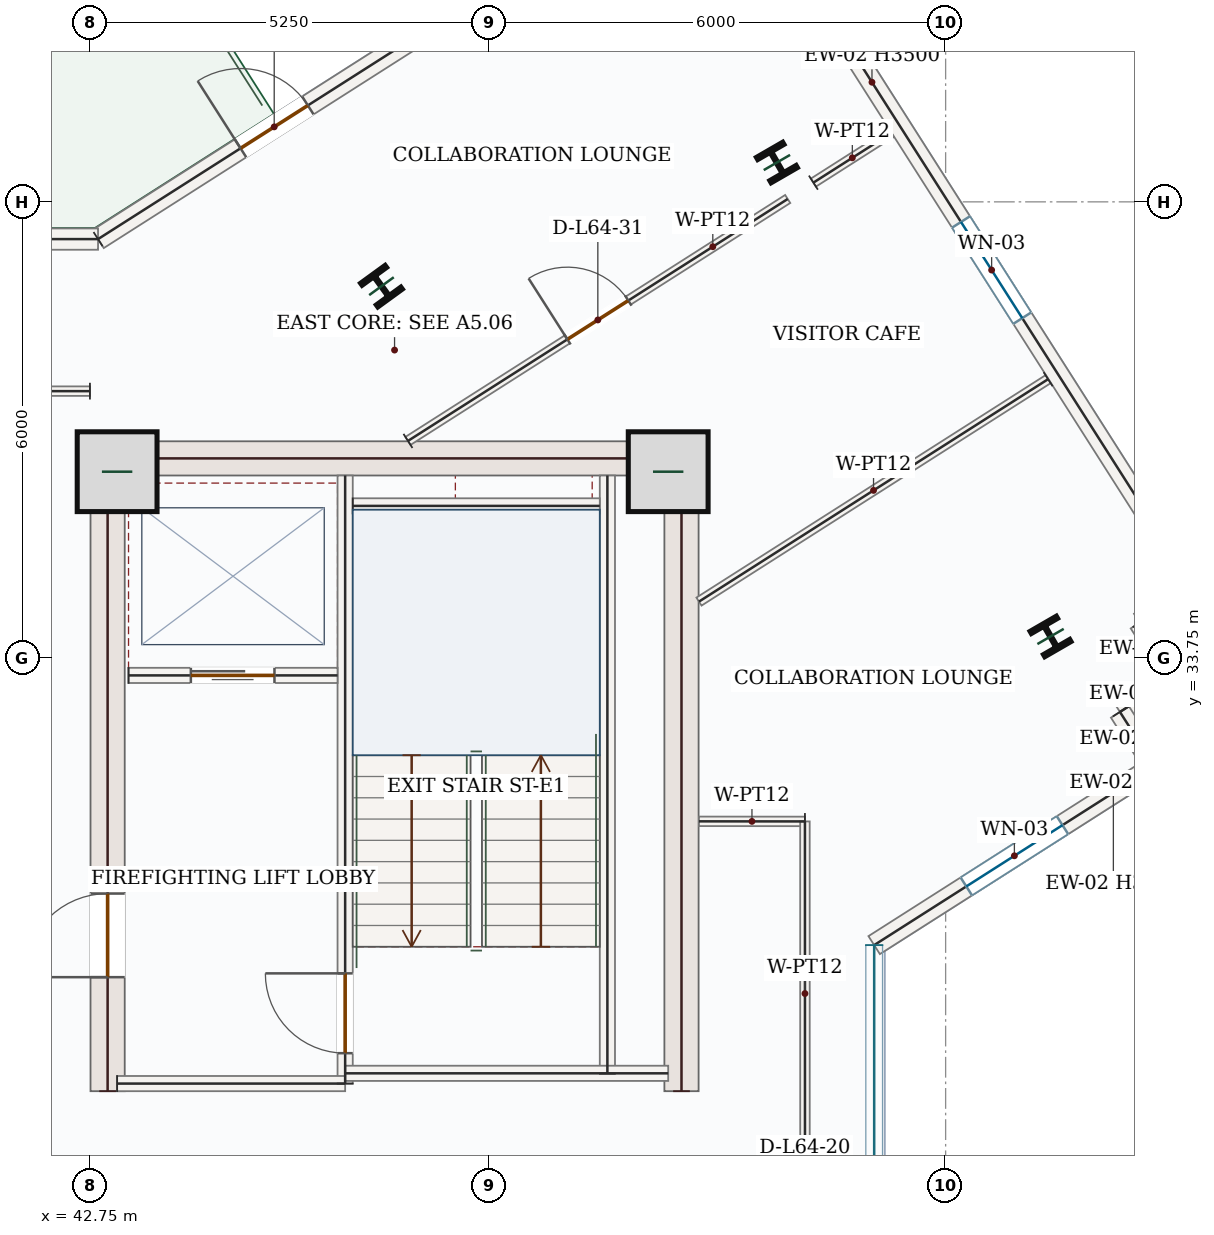
"""IFC4 building model, lengths in metres.
Left out: names, types, materials, properties, quantities, classifications, styles, units other than length and angle.
Written with IfcOpenShell. Run it as: python <this file> out.ifc"""

import sys

from ifc_helpers import new_model, si_unit, direction, frame, frame_2d, origin, origin_2d, place, context, subcontext, project, spatial, rectangle, i_section, extrude, source, transform, mapped, element, fill, save


model = new_model("IFC4")
c1 = context("Model", 3, precision=1e-05, world=origin(), true_north=direction((0.0, 1.0)))
c2 = subcontext(c1, "Body", "Model", "MODEL_VIEW")
j1 = project(units=[si_unit("LENGTHUNIT", "METRE"), si_unit("PLANEANGLEUNIT", "RADIAN")], contexts=[c1])
p1 = place(None, origin())
s1 = spatial("IfcSite", under=j1, at=p1, CompositionType="ELEMENT")
p2 = place(p1, origin())
s2 = spatial("IfcBuilding", under=s1, at=p2, CompositionType="ELEMENT")
p3 = place(p2, frame((0.0, 0.0, 269.1)))
s3 = spatial("IfcBuildingStorey", under=s2, at=p3, CompositionType="ELEMENT", Elevation=269.1)
p4 = place(p3, frame((42.975, 28.05, 0.0), z_axis=(0.0, 0.0, 1.0), x_axis=(0.0, 1.0, 0.0)))
e1 = element("IfcWall", 1, at=p4, inside=s3, PredefinedType="SHEAR", context=c2, shape_type="SweptSolid", body=[
    extrude(rectangle(XDim=8.55, YDim=0.45, at=frame_2d((4.275, 0.0))), origin(), (0.0, 0.0, 1.0), 3.5),
])
p5 = place(p4, frame((1.5, 0.0, 0.0)))
e2 = element("IfcOpeningElement", 2, at=p5, cuts=e1, PredefinedType="OPENING", context=c2, shape_type="SweptSolid", body=[
    extrude(rectangle(XDim=1.1, YDim=2.2, at=frame_2d((0.55, 1.1))), frame((0.0, 0.235, 0.0), z_axis=(0.0, -1.0, 0.0), x_axis=(1.0, 0.0, 0.0)), (0.0, 0.0, 1.0), 0.47),
])
m1 = source(origin(), c2, "Body", "SweptSolid", [
    extrude(rectangle(XDim=8.55, YDim=0.45, at=frame_2d((4.275, 0.0))), origin(), (0.0, 0.0, 1.0), 3.5),
])
p6 = place(p3, frame((50.525, 28.05, 0.0), z_axis=(0.0, 0.0, 1.0), x_axis=(0.0, 1.0, 0.0)))
e3 = element("IfcWall", 3, at=p6, inside=s3, PredefinedType="SHEAR", context=c2, shape_type="MappedRepresentation", body=[
    mapped(m1, transform((0.0, 0.0, 0.0), x_axis=(1.0, 0.0, 0.0), y_axis=(0.0, 1.0, 0.0), z_axis=(0.0, 0.0, 1.0), scale=1.0)),
])
m2 = source(origin(), c2, "Body", "SweptSolid", [
    extrude(rectangle(XDim=7.1, YDim=0.45, at=frame_2d((3.55, 0.0))), origin(), (0.0, 0.0, 1.0), 3.5),
])
p7 = place(p3, frame((43.2, 36.375, 0.0), z_axis=(0.0, 0.0, 1.0), x_axis=(1.0, 0.0, 0.0)))
e4 = element("IfcWall", 4, at=p7, inside=s3, PredefinedType="SHEAR", context=c2, shape_type="MappedRepresentation", body=[
    mapped(m2, transform((0.0, 0.0, 0.0), x_axis=(1.0, 0.0, 0.0), y_axis=(0.0, 1.0, 0.0), z_axis=(0.0, 0.0, 1.0), scale=1.0)),
])
m3 = source(origin(), c2, "Body", "SweptSolid", [
    extrude(rectangle(XDim=1.05, YDim=1.05, at=origin_2d()), origin(), (0.0, 0.0, 1.0), 3.75),
])
for number, where, z_axis, x_axis in (
    (5, (43.1, 36.2, 0.0), (0.0, 0.0, 1.0), (1.0, 0.0, 0.0)),
    (6, (50.35, 36.2, 0.0), (0.0, 0.0, 1.0), (1.0, 0.0, 0.0)),
):
    element("IfcColumn", number, at=place(p3, frame(where, z_axis=z_axis, x_axis=x_axis)), inside=s3, PredefinedType="COLUMN", context=c2, shape_type="MappedRepresentation", body=[
        mapped(m3, transform((0.0, 0.0, 0.0), x_axis=(1.0, 0.0, 0.0), y_axis=(0.0, 1.0, 0.0), z_axis=(0.0, 0.0, 1.0), scale=1.0)),
    ])
m4 = source(origin(), c2, "Body", "SweptSolid", [
    extrude(i_section(OverallWidth=0.399, OverallDepth=0.386, WebThickness=0.021, FlangeThickness=0.033, FilletRadius=0.018, at=origin_2d()), origin(), (0.0, 0.0, 1.0), 3.75),
])
for number, where, z_axis, x_axis in (
    (7, (46.578, 38.641, 0.0), (0.0, 0.0, 1.0), (0.809, 0.588, 0.0)),
    (8, (55.38, 34.032, 0.0), (0.0, 0.0, 1.0), (0.866, 0.5, 0.0)),
    (9, (51.78, 40.268, 0.0), (0.0, 0.0, 1.0), (0.866, 0.5, 0.0)),
):
    element("IfcColumn", number, at=place(p3, frame(where, z_axis=z_axis, x_axis=x_axis)), inside=s3, PredefinedType="COLUMN", context=c2, shape_type="MappedRepresentation", body=[
        mapped(m4, transform((0.0, 0.0, 0.0), x_axis=(1.0, 0.0, 0.0), y_axis=(0.0, 1.0, 0.0), z_axis=(0.0, 0.0, 1.0), scale=1.0)),
    ])
p8 = place(p3, frame((42.849, 39.26, 0.0), z_axis=(0.0, 0.0, 1.0), x_axis=(0.843388565396, 0.537304129669, 0.0)))
e10 = element("IfcWall", 10, at=p8, inside=s3, PredefinedType="SOLIDWALL", context=c2, shape_type="SweptSolid", body=[
    extrude(rectangle(XDim=7.996, YDim=0.28, at=frame_2d((3.998, 0.0))), origin(), (0.0, 0.0, 1.0), 3.5),
])
p9 = place(p8, frame((2.223, 0.0, 0.0)))
e11 = element("IfcOpeningElement", 11, at=p9, cuts=e10, PredefinedType="OPENING", context=c2, shape_type="SweptSolid", body=[
    extrude(rectangle(XDim=1.05, YDim=2.15, at=frame_2d((0.525, 1.075))), frame((0.0, 0.15, 0.0), z_axis=(0.0, -1.0, 0.0), x_axis=(1.0, 0.0, 0.0)), (0.0, 0.0, 1.0), 0.3),
])
p10 = place(p3, frame((51.94, 43.036, 0.0), z_axis=(0.0, 0.0, 1.0), x_axis=(0.537314949054, -0.843381672508, 0.0)))
e12 = element("IfcWall", 12, at=p10, inside=s3, PredefinedType="SOLIDWALL", context=c2, shape_type="SweptSolid", body=[
    extrude(rectangle(XDim=9.92, YDim=0.28, at=frame_2d((4.96, 0.0))), origin(), (0.0, 0.0, 1.0), 3.5),
])
p11 = place(p10, frame((4.21, 0.0, 0.85)))
e13 = element("IfcOpeningElement", 13, at=p11, cuts=e12, PredefinedType="OPENING", context=c2, shape_type="SweptSolid", body=[
    extrude(rectangle(XDim=1.5, YDim=1.5, at=frame_2d((0.75, 0.75))), frame((0.0, 0.15, 0.0), z_axis=(0.0, -1.0, 0.0), x_axis=(1.0, 0.0, 0.0)), (0.0, 0.0, 1.0), 0.3),
])
m5 = source(origin(), c2, "Body", "SweptSolid", [
    extrude(rectangle(XDim=0.85, YDim=0.28, at=frame_2d((0.425, 0.0))), origin(), (0.0, 0.0, 1.0), 3.5),
])
p12 = place(p3, frame((57.27, 34.67, 0.0), z_axis=(0.0, 0.0, 1.0), x_axis=(-0.843401251716, -0.537284215853, 0.0)))
e14 = element("IfcWall", 14, at=p12, inside=s3, PredefinedType="SOLIDWALL", context=c2, shape_type="MappedRepresentation", body=[
    mapped(m5, transform((0.0, 0.0, 0.0), x_axis=(1.0, 0.0, 0.0), y_axis=(0.0, 1.0, 0.0), z_axis=(0.0, 0.0, 1.0), scale=1.0)),
])
m6 = source(origin(), c2, "Body", "SweptSolid", [
    extrude(rectangle(XDim=0.85, YDim=0.28, at=frame_2d((0.425, 0.0))), origin(), (0.0, 0.0, 1.0), 3.5),
])
for number, where, z_axis, x_axis in (
    (15, (56.553, 34.213, 0.0), (0.0, 0.0, 1.0), (0.537, -0.843, 0.0)),
    (16, (57.01, 33.496, 0.0), (0.0, 0.0, 1.0), (-0.843, -0.537, 0.0)),
    (17, (56.293, 33.039, 0.0), (0.0, 0.0, 1.0), (0.537, -0.843, 0.0)),
):
    element("IfcWall", number, at=place(p3, frame(where, z_axis=z_axis, x_axis=x_axis)), inside=s3, PredefinedType="SOLIDWALL", context=c2, shape_type="MappedRepresentation", body=[
        mapped(m6, transform((0.0, 0.0, 0.0), x_axis=(1.0, 0.0, 0.0), y_axis=(0.0, 1.0, 0.0), z_axis=(0.0, 0.0, 1.0), scale=1.0)),
    ])
p13 = place(p3, frame((56.75, 32.323, 0.0), z_axis=(0.0, 0.0, 1.0), x_axis=(-0.843383352012, -0.537312312857, 0.0)))
e18 = element("IfcWall", 18, at=p13, inside=s3, PredefinedType="SOLIDWALL", context=c2, shape_type="SweptSolid", body=[
    extrude(rectangle(XDim=4.375, YDim=0.28, at=frame_2d((2.188, 0.0))), origin(), (0.0, 0.0, 1.0), 3.5),
])
p14 = place(p13, frame((1.438, 0.0, 0.85)))
e19 = element("IfcOpeningElement", 19, at=p14, cuts=e18, PredefinedType="OPENING", context=c2, shape_type="SweptSolid", body=[
    extrude(rectangle(XDim=1.5, YDim=1.5, at=frame_2d((0.75, 0.75))), frame((0.0, 0.15, 0.0), z_axis=(0.0, -1.0, 0.0), x_axis=(1.0, 0.0, 0.0)), (0.0, 0.0, 1.0), 0.3),
])
m7 = source(origin(), c2, "Body", "SweptSolid", [
    extrude(rectangle(XDim=6.763, YDim=0.28, at=frame_2d((3.381, 0.0))), origin(), (0.0, 0.0, 1.0), 3.5),
])
p15 = place(p3, frame((36.086, 39.26, 0.0), z_axis=(0.0, 0.0, 1.0), x_axis=(1.0, 0.0, 0.0)))
e20 = element("IfcWall", 20, at=p15, inside=s3, PredefinedType="SOLIDWALL", context=c2, shape_type="MappedRepresentation", body=[
    mapped(m7, transform((0.0, 0.0, 0.0), x_axis=(1.0, 0.0, 0.0), y_axis=(0.0, 1.0, 0.0), z_axis=(0.0, 0.0, 1.0), scale=1.0)),
])
m8 = source(origin(), c2, "Body", "SweptSolid", [
    extrude(rectangle(XDim=7.87, YDim=0.2, at=frame_2d((3.935, 0.0))), origin(), (0.0, 0.0, 1.0), 3.5),
])
p16 = place(p3, frame((49.55, 28.28, 0.0), z_axis=(0.0, 0.0, 1.0), x_axis=(0.0, 1.0, 0.0)))
e21 = element("IfcWall", 21, at=p16, inside=s3, PredefinedType="SOLIDWALL", context=c2, shape_type="MappedRepresentation", body=[
    mapped(m8, transform((0.0, 0.0, 0.0), x_axis=(1.0, 0.0, 0.0), y_axis=(0.0, 1.0, 0.0), z_axis=(0.0, 0.0, 1.0), scale=1.0)),
])
p17 = place(p3, frame((46.1, 28.15, 0.0), z_axis=(0.0, 0.0, 1.0), x_axis=(0.0, 1.0, 0.0)))
e22 = element("IfcWall", 22, at=p17, inside=s3, PredefinedType="SOLIDWALL", context=c2, shape_type="SweptSolid", body=[
    extrude(rectangle(XDim=8.0, YDim=0.2, at=frame_2d((4.0, 0.0))), origin(), (0.0, 0.0, 1.0), 3.5),
])
p18 = place(p17, frame((0.4, 0.0, 0.0)))
e23 = element("IfcOpeningElement", 23, at=p18, cuts=e22, PredefinedType="OPENING", context=c2, shape_type="SweptSolid", body=[
    extrude(rectangle(XDim=1.05, YDim=2.15, at=frame_2d((0.525, 1.075))), frame((0.0, 0.11, 0.0), z_axis=(0.0, -1.0, 0.0), x_axis=(1.0, 0.0, 0.0)), (0.0, 0.0, 1.0), 0.22),
])
m9 = source(origin(), c2, "Body", "SweptSolid", [
    extrude(rectangle(XDim=3.0, YDim=0.2, at=frame_2d((1.5, 0.0))), origin(), (0.0, 0.0, 1.0), 3.5),
])
p19 = place(p3, frame((43.1, 28.15, 0.0), z_axis=(0.0, 0.0, 1.0), x_axis=(1.0, 0.0, 0.0)))
e24 = element("IfcWall", 24, at=p19, inside=s3, PredefinedType="SOLIDWALL", context=c2, shape_type="MappedRepresentation", body=[
    mapped(m9, transform((0.0, 0.0, 0.0), x_axis=(1.0, 0.0, 0.0), y_axis=(0.0, 1.0, 0.0), z_axis=(0.0, 0.0, 1.0), scale=1.0)),
])
m10 = source(origin(), c2, "Body", "SweptSolid", [
    extrude(rectangle(XDim=4.25, YDim=0.2, at=frame_2d((2.125, 0.0))), origin(), (0.0, 0.0, 1.0), 3.5),
])
p20 = place(p3, frame((46.1, 28.285, 0.0), z_axis=(0.0, 0.0, 1.0), x_axis=(1.0, 0.0, 0.0)))
e25 = element("IfcWall", 25, at=p20, inside=s3, PredefinedType="SOLIDWALL", context=c2, shape_type="MappedRepresentation", body=[
    mapped(m10, transform((0.0, 0.0, 0.0), x_axis=(1.0, 0.0, 0.0), y_axis=(0.0, 1.0, 0.0), z_axis=(0.0, 0.0, 1.0), scale=1.0)),
])
m11 = source(origin(), c2, "Body", "SweptSolid", [
    extrude(rectangle(XDim=3.25, YDim=0.2, at=frame_2d((1.625, 0.0))), origin(), (0.0, 0.0, 1.0), 3.5),
])
p21 = place(p3, frame((46.2, 35.75, 0.0), z_axis=(0.0, 0.0, 1.0), x_axis=(1.0, 0.0, 0.0)))
e26 = element("IfcWall", 26, at=p21, inside=s3, PredefinedType="SOLIDWALL", context=c2, shape_type="MappedRepresentation", body=[
    mapped(m11, transform((0.0, 0.0, 0.0), x_axis=(1.0, 0.0, 0.0), y_axis=(0.0, 1.0, 0.0), z_axis=(0.0, 0.0, 1.0), scale=1.0)),
])
p22 = place(p3, frame((43.25, 33.52, 0.0), z_axis=(0.0, 0.0, 1.0), x_axis=(1.0, 0.0, 0.0)))
e27 = element("IfcWall", 27, at=p22, inside=s3, PredefinedType="SOLIDWALL", context=c2, shape_type="SweptSolid", body=[
    extrude(rectangle(XDim=2.75, YDim=0.2, at=frame_2d((1.375, 0.0))), origin(), (0.0, 0.0, 1.0), 3.5),
])
p23 = place(p22, frame((0.82, 0.0, 0.0)))
e28 = element("IfcOpeningElement", 28, at=p23, cuts=e27, PredefinedType="OPENING", context=c2, shape_type="SweptSolid", body=[
    extrude(rectangle(XDim=1.1, YDim=2.15, at=frame_2d((0.55, 1.075))), frame((0.0, 0.11, 0.0), z_axis=(0.0, -1.0, 0.0), x_axis=(1.0, 0.0, 0.0)), (0.0, 0.0, 1.0), 0.22),
])
p24 = place(p3, frame((46.927, 36.605, 0.0), z_axis=(0.0, 0.0, 1.0), x_axis=(0.843398332862, 0.537288797693, 0.0)))
e29 = element("IfcWall", 29, at=p24, inside=s3, PredefinedType="PARTITIONING", context=c2, shape_type="SweptSolid", body=[
    extrude(rectangle(XDim=5.924, YDim=0.125, at=frame_2d((2.962, 0.0))), origin(), (0.0, 0.0, 1.0), 3.5),
])
p25 = place(p24, frame((2.487, 0.0, 0.0)))
e30 = element("IfcOpeningElement", 30, at=p25, cuts=e29, PredefinedType="OPENING", context=c2, shape_type="SweptSolid", body=[
    extrude(rectangle(XDim=0.95, YDim=2.15, at=frame_2d((0.475, 1.075))), frame((0.0, 0.073, 0.0), z_axis=(0.0, -1.0, 0.0), x_axis=(1.0, 0.0, 0.0)), (0.0, 0.0, 1.0), 0.145),
])
m12 = source(origin(), c2, "Body", "SweptSolid", [
    extrude(rectangle(XDim=1.215, YDim=0.125, at=frame_2d((0.607, 0.0))), origin(), (0.0, 0.0, 1.0), 3.5),
])
p26 = place(p3, frame((52.26, 40.003, 0.0), z_axis=(0.0, 0.0, 1.0), x_axis=(0.84340481812, 0.537278617453, 0.0)))
e31 = element("IfcWall", 31, at=p26, inside=s3, PredefinedType="PARTITIONING", context=c2, shape_type="MappedRepresentation", body=[
    mapped(m12, transform((0.0, 0.0, 0.0), x_axis=(1.0, 0.0, 0.0), y_axis=(0.0, 1.0, 0.0), z_axis=(0.0, 0.0, 1.0), scale=1.0)),
])
m13 = source(origin(), c2, "Body", "SweptSolid", [
    extrude(rectangle(XDim=5.446, YDim=0.125, at=frame_2d((2.723, 0.0))), origin(), (0.0, 0.0, 1.0), 3.5),
])
p27 = place(p3, frame((55.348, 37.417, 0.0), z_axis=(0.0, 0.0, 1.0), x_axis=(-0.843395566027, -0.537293140851, 0.0)))
e32 = element("IfcWall", 32, at=p27, inside=s3, PredefinedType="PARTITIONING", context=c2, shape_type="MappedRepresentation", body=[
    mapped(m13, transform((0.0, 0.0, 0.0), x_axis=(1.0, 0.0, 0.0), y_axis=(0.0, 1.0, 0.0), z_axis=(0.0, 0.0, 1.0), scale=1.0)),
])
m14 = source(origin(), c2, "Body", "SweptSolid", [
    extrude(rectangle(XDim=1.394, YDim=0.125, at=frame_2d((0.697, 0.0))), origin(), (0.0, 0.0, 1.0), 3.5),
])
p28 = place(p3, frame((52.149, 31.599, 0.0), z_axis=(0.0, 0.0, 1.0), x_axis=(-0.999999754632, 0.000700525222, 0.0)))
e33 = element("IfcWall", 33, at=p28, inside=s3, PredefinedType="PARTITIONING", context=c2, shape_type="MappedRepresentation", body=[
    mapped(m14, transform((0.0, 0.0, 0.0), x_axis=(1.0, 0.0, 0.0), y_axis=(0.0, 1.0, 0.0), z_axis=(0.0, 0.0, 1.0), scale=1.0)),
])
p29 = place(p3, frame((52.15, 23.451, 0.0), z_axis=(0.0, 0.0, 1.0), x_axis=(-0.000119850186, 0.999999992818, 0.0)))
e34 = element("IfcWall", 34, at=p29, inside=s3, PredefinedType="PARTITIONING", context=c2, shape_type="SweptSolid", body=[
    extrude(rectangle(XDim=8.148, YDim=0.125, at=frame_2d((4.074, 0.0))), origin(), (0.0, 0.0, 1.0), 3.5),
])
p30 = place(p29, frame((2.519, 0.0, 0.0)))
e35 = element("IfcOpeningElement", 35, at=p30, cuts=e34, PredefinedType="OPENING", context=c2, shape_type="SweptSolid", body=[
    extrude(rectangle(XDim=0.95, YDim=2.15, at=frame_2d((0.475, 1.075))), frame((0.0, 0.073, 0.0), z_axis=(0.0, -1.0, 0.0), x_axis=(1.0, 0.0, 0.0)), (0.0, 0.0, 1.0), 0.145),
])
p31 = place(p3, frame((42.742, 37.26, 0.0), z_axis=(0.0, 0.0, 1.0), x_axis=(-0.999999998515, 5.4504824e-05, 0.0)))
e36 = element("IfcWall", 36, at=p31, inside=s3, PredefinedType="PARTITIONING", context=c2, shape_type="SweptSolid", body=[
    extrude(rectangle(XDim=4.479, YDim=0.125, at=frame_2d((2.24, 0.0))), origin(), (0.0, 0.0, 1.0), 3.5),
])
p32 = place(p31, frame((2.753, 0.0, 0.0)))
e37 = element("IfcOpeningElement", 37, at=p32, cuts=e36, PredefinedType="OPENING", context=c2, shape_type="SweptSolid", body=[
    extrude(rectangle(XDim=0.95, YDim=2.15, at=frame_2d((0.475, 1.075))), frame((0.0, 0.073, 0.0), z_axis=(0.0, -1.0, 0.0), x_axis=(1.0, 0.0, 0.0)), (0.0, 0.0, 1.0), 0.145),
])
m15 = source(origin(), c2, "Body", "SweptSolid", [
    extrude(rectangle(XDim=1.05, YDim=2.15, at=frame_2d((0.525, 1.075))), frame((0.0, 0.025, 0.0), z_axis=(0.0, -1.0, 0.0), x_axis=(1.0, 0.0, 0.0)), (0.0, 0.0, 1.0), 0.05),
])
p33 = place(p9, origin())
e38 = element("IfcDoor", 38, at=p33, inside=s3, OperationType="SINGLE_SWING_LEFT", PredefinedType="DOOR", context=c2, shape_type="MappedRepresentation", body=[
    mapped(m15, transform((0.0, 0.0, 0.0), x_axis=(1.0, 0.0, 0.0), y_axis=(0.0, 1.0, 0.0), z_axis=(0.0, 0.0, 1.0), scale=1.0)),
])
fill(e11, e38)
m16 = source(origin(), c2, "Body", "SweptSolid", [
    extrude(rectangle(XDim=1.5, YDim=1.5, at=frame_2d((0.75, 0.75))), frame((0.0, 0.03, 0.0), z_axis=(0.0, -1.0, 0.0), x_axis=(1.0, 0.0, 0.0)), (0.0, 0.0, 1.0), 0.06),
])
p34 = place(p11, origin())
e39 = element("IfcWindow", 39, at=p34, inside=s3, PartitioningType="SINGLE_PANEL", PredefinedType="WINDOW", context=c2, shape_type="MappedRepresentation", body=[
    mapped(m16, transform((0.0, 0.0, 0.0), x_axis=(1.0, 0.0, 0.0), y_axis=(0.0, 1.0, 0.0), z_axis=(0.0, 0.0, 1.0), scale=1.0)),
])
fill(e13, e39)
p35 = place(p14, origin())
e40 = element("IfcWindow", 40, at=p35, inside=s3, PartitioningType="SINGLE_PANEL", PredefinedType="WINDOW", context=c2, shape_type="MappedRepresentation", body=[
    mapped(m16, transform((0.0, 0.0, 0.0), x_axis=(1.0, 0.0, 0.0), y_axis=(0.0, 1.0, 0.0), z_axis=(0.0, 0.0, 1.0), scale=1.0)),
])
fill(e19, e40)
p36 = place(p18, origin())
e41 = element("IfcDoor", 41, at=p36, inside=s3, OperationType="SINGLE_SWING_RIGHT", PredefinedType="DOOR", context=c2, shape_type="MappedRepresentation", body=[
    mapped(m15, transform((0.0, 0.0, 0.0), x_axis=(1.0, 0.0, 0.0), y_axis=(0.0, 1.0, 0.0), z_axis=(0.0, 0.0, 1.0), scale=1.0)),
])
fill(e23, e41)
m17 = source(origin(), c2, "Body", "SweptSolid", [
    extrude(rectangle(XDim=1.1, YDim=2.15, at=frame_2d((0.55, 1.075))), frame((0.0, 0.025, 0.0), z_axis=(0.0, -1.0, 0.0), x_axis=(1.0, 0.0, 0.0)), (0.0, 0.0, 1.0), 0.05),
])
p37 = place(p23, origin())
e42 = element("IfcDoor", 42, at=p37, inside=s3, OperationType="DOUBLE_DOOR_SLIDING", PredefinedType="DOOR", context=c2, shape_type="MappedRepresentation", body=[
    mapped(m17, transform((0.0, 0.0, 0.0), x_axis=(1.0, 0.0, 0.0), y_axis=(0.0, 1.0, 0.0), z_axis=(0.0, 0.0, 1.0), scale=1.0)),
])
fill(e28, e42)
m18 = source(origin(), c2, "Body", "SweptSolid", [
    extrude(rectangle(XDim=1.1, YDim=2.2, at=frame_2d((0.55, 1.1))), frame((0.0, 0.025, 0.0), z_axis=(0.0, -1.0, 0.0), x_axis=(1.0, 0.0, 0.0)), (0.0, 0.0, 1.0), 0.05),
])
p38 = place(p5, origin())
e43 = element("IfcDoor", 43, at=p38, inside=s3, OperationType="SINGLE_SWING_LEFT", PredefinedType="DOOR", context=c2, shape_type="MappedRepresentation", body=[
    mapped(m18, transform((0.0, 0.0, 0.0), x_axis=(1.0, 0.0, 0.0), y_axis=(0.0, 1.0, 0.0), z_axis=(0.0, 0.0, 1.0), scale=1.0)),
])
fill(e2, e43)
m19 = source(origin(), c2, "Body", "SweptSolid", [
    extrude(rectangle(XDim=0.95, YDim=2.15, at=frame_2d((0.475, 1.075))), frame((0.0, 0.025, 0.0), z_axis=(0.0, -1.0, 0.0), x_axis=(1.0, 0.0, 0.0)), (0.0, 0.0, 1.0), 0.05),
])
p39 = place(p25, origin())
e44 = element("IfcDoor", 44, at=p39, inside=s3, OperationType="SINGLE_SWING_LEFT", PredefinedType="DOOR", context=c2, shape_type="MappedRepresentation", body=[
    mapped(m19, transform((0.0, 0.0, 0.0), x_axis=(1.0, 0.0, 0.0), y_axis=(0.0, 1.0, 0.0), z_axis=(0.0, 0.0, 1.0), scale=1.0)),
])
fill(e30, e44)
save(model, sys.argv[1])
